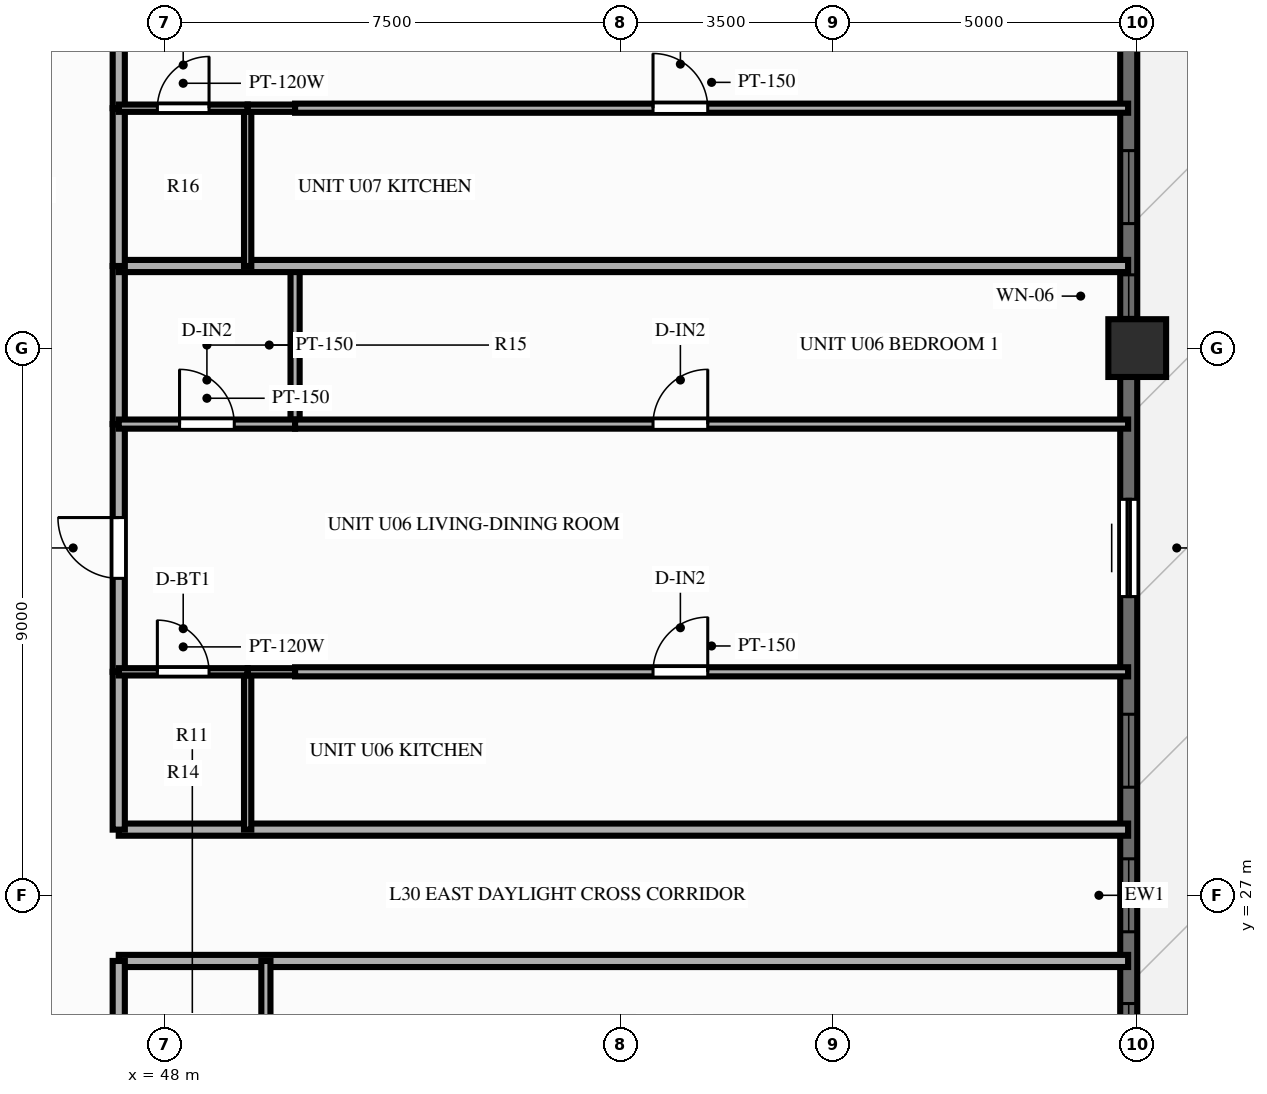
"""IFC4 building model, lengths in metres.
Left out: names, types, materials, properties, quantities, classifications, styles, units other than length and angle.
Written with IfcOpenShell. Run it as: python <this file> out.ifc"""

import sys

from ifc_helpers import new_model, si_unit, direction, frame, frame_2d, origin, origin_2d, place, context, subcontext, project, spatial, rectangle, extrude, source, transform, mapped, element, fill, save


model = new_model("IFC4")
c1 = context("Model", 3, precision=1e-05, world=origin(), true_north=direction((0.0, 1.0)))
c2 = subcontext(c1, "Body", "Model", "MODEL_VIEW")
j1 = project(units=[si_unit("LENGTHUNIT", "METRE"), si_unit("PLANEANGLEUNIT", "RADIAN")], contexts=[c1])
p1 = place(None, origin())
s1 = spatial("IfcSite", under=j1, at=p1, CompositionType="ELEMENT")
p2 = place(p1, origin())
s2 = spatial("IfcBuilding", under=s1, at=p2, CompositionType="ELEMENT")
p3 = place(p2, frame((0.0, 0.0, 95.85)))
s3 = spatial("IfcBuildingStorey", under=s2, at=p3, CompositionType="ELEMENT", Elevation=95.85)
m1 = source(origin(), c2, "Body", "SweptSolid", [
    extrude(rectangle(XDim=0.95, YDim=0.95, at=origin_2d()), origin(), (0.0, 0.0, 1.0), 3.0),
])
p4 = place(p3, frame((64.0, 36.0, 0.0), z_axis=(0.0, 0.0, 1.0), x_axis=(1.0, 0.0, 0.0)))
e1 = element("IfcColumn", 1, at=p4, inside=s3, PredefinedType="COLUMN", context=c2, shape_type="MappedRepresentation", body=[
    mapped(m1, transform((0.0, 0.0, 0.0), scale=1.0)),
])
p5 = place(p3, frame((63.86, 7.2, 0.0), z_axis=(0.0, 0.0, 1.0), x_axis=(0.0, 1.0, 0.0)))
e2 = element("IfcWall", 2, at=p5, inside=s3, PredefinedType="SOLIDWALL", context=c2, shape_type="SweptSolid", body=[
    extrude(rectangle(XDim=39.6, YDim=0.28, at=frame_2d((19.8, 0.0))), origin(), (0.0, 0.0, 1.0), 2.28),
])
p6 = place(p5, frame((0.945, 0.0, 0.25)))
e3 = element("IfcOpeningElement", 3, at=p6, cuts=e2, PredefinedType="OPENING", context=c2, shape_type="SweptSolid", body=[
    extrude(rectangle(XDim=1.2, YDim=1.5, at=frame_2d((0.6, 0.75))), frame((0.0, 0.152, 0.0), z_axis=(0.0, -1.0, 0.0), x_axis=(1.0, 0.0, 0.0)), (0.0, 0.0, 1.0), 0.304),
])
p7 = place(p5, frame((4.213, 0.0, 0.25)))
e4 = element("IfcOpeningElement", 4, at=p7, cuts=e2, PredefinedType="OPENING", context=c2, shape_type="SweptSolid", body=[
    extrude(rectangle(XDim=1.2, YDim=1.5, at=frame_2d((0.6, 0.75))), frame((0.0, 0.152, 0.0), z_axis=(0.0, -1.0, 0.0), x_axis=(1.0, 0.0, 0.0)), (0.0, 0.0, 1.0), 0.304),
])
p8 = place(p5, frame((7.55, 0.0, 0.25)))
e5 = element("IfcOpeningElement", 5, at=p8, cuts=e2, PredefinedType="OPENING", context=c2, shape_type="SweptSolid", body=[
    extrude(rectangle(XDim=1.2, YDim=1.5, at=frame_2d((0.6, 0.75))), frame((0.0, 0.152, 0.0), z_axis=(0.0, -1.0, 0.0), x_axis=(1.0, 0.0, 0.0)), (0.0, 0.0, 1.0), 0.304),
])
p9 = place(p5, frame((13.483, 0.0, 0.25)))
e6 = element("IfcOpeningElement", 6, at=p9, cuts=e2, PredefinedType="OPENING", context=c2, shape_type="SweptSolid", body=[
    extrude(rectangle(XDim=1.2, YDim=1.5, at=frame_2d((0.6, 0.75))), frame((0.0, 0.152, 0.0), z_axis=(0.0, -1.0, 0.0), x_axis=(1.0, 0.0, 0.0)), (0.0, 0.0, 1.0), 0.304),
])
p10 = place(p5, frame((16.82, 0.0, 0.25)))
e7 = element("IfcOpeningElement", 7, at=p10, cuts=e2, PredefinedType="OPENING", context=c2, shape_type="SweptSolid", body=[
    extrude(rectangle(XDim=1.2, YDim=1.5, at=frame_2d((0.6, 0.75))), frame((0.0, 0.152, 0.0), z_axis=(0.0, -1.0, 0.0), x_axis=(1.0, 0.0, 0.0)), (0.0, 0.0, 1.0), 0.304),
])
p11 = place(p5, frame((19.2, 0.0, 0.25)))
e8 = element("IfcOpeningElement", 8, at=p11, cuts=e2, PredefinedType="OPENING", context=c2, shape_type="SweptSolid", body=[
    extrude(rectangle(XDim=1.2, YDim=1.5, at=frame_2d((0.6, 0.75))), frame((0.0, 0.152, 0.0), z_axis=(0.0, -1.0, 0.0), x_axis=(1.0, 0.0, 0.0)), (0.0, 0.0, 1.0), 0.304),
])
p12 = place(p5, frame((21.578, 0.0, 0.25)))
e9 = element("IfcOpeningElement", 9, at=p12, cuts=e2, PredefinedType="OPENING", context=c2, shape_type="SweptSolid", body=[
    extrude(rectangle(XDim=1.2, YDim=1.5, at=frame_2d((0.6, 0.75))), frame((0.0, 0.152, 0.0), z_axis=(0.0, -1.0, 0.0), x_axis=(1.0, 0.0, 0.0)), (0.0, 0.0, 1.0), 0.304),
])
p13 = place(p5, frame((26.313, 0.0, 0.0), z_axis=(0.0, 0.0, 1.0), x_axis=(-1.0, 0.0, 0.0)))
e10 = element("IfcOpeningElement", 10, at=p13, cuts=e2, PredefinedType="OPENING", context=c2, shape_type="SweptSolid", body=[
    extrude(rectangle(XDim=1.6, YDim=2.15, at=frame_2d((0.8, 1.075))), frame((0.0, 0.152, 0.0), z_axis=(0.0, -1.0, 0.0), x_axis=(1.0, 0.0, 0.0)), (0.0, 0.0, 1.0), 0.304),
])
p14 = place(p5, frame((29.305, 0.0, 0.25)))
e11 = element("IfcOpeningElement", 11, at=p14, cuts=e2, PredefinedType="OPENING", context=c2, shape_type="SweptSolid", body=[
    extrude(rectangle(XDim=0.7, YDim=1.5, at=frame_2d((0.35, 0.75))), frame((0.0, 0.152, 0.0), z_axis=(0.0, -1.0, 0.0), x_axis=(1.0, 0.0, 0.0)), (0.0, 0.0, 1.0), 0.304),
])
p15 = place(p5, frame((30.848, 0.0, 0.25)))
e12 = element("IfcOpeningElement", 12, at=p15, cuts=e2, PredefinedType="OPENING", context=c2, shape_type="SweptSolid", body=[
    extrude(rectangle(XDim=1.2, YDim=1.5, at=frame_2d((0.6, 0.75))), frame((0.0, 0.152, 0.0), z_axis=(0.0, -1.0, 0.0), x_axis=(1.0, 0.0, 0.0)), (0.0, 0.0, 1.0), 0.304),
])
p16 = place(p5, frame((34.183, 0.0, 0.25)))
e13 = element("IfcOpeningElement", 13, at=p16, cuts=e2, PredefinedType="OPENING", context=c2, shape_type="SweptSolid", body=[
    extrude(rectangle(XDim=1.2, YDim=1.5, at=frame_2d((0.6, 0.75))), frame((0.0, 0.152, 0.0), z_axis=(0.0, -1.0, 0.0), x_axis=(1.0, 0.0, 0.0)), (0.0, 0.0, 1.0), 0.304),
])
p17 = place(p5, frame((37.452, 0.0, 0.25)))
e14 = element("IfcOpeningElement", 14, at=p17, cuts=e2, PredefinedType="OPENING", context=c2, shape_type="SweptSolid", body=[
    extrude(rectangle(XDim=1.2, YDim=1.5, at=frame_2d((0.6, 0.75))), frame((0.0, 0.152, 0.0), z_axis=(0.0, -1.0, 0.0), x_axis=(1.0, 0.0, 0.0)), (0.0, 0.0, 1.0), 0.304),
])
p18 = place(p3, frame((47.25, 25.92, 0.0), z_axis=(0.0, 0.0, 1.0), x_axis=(1.0, 0.0, 0.0)))
e15 = element("IfcWall", 15, at=p18, inside=s3, PredefinedType="PARTITIONING", context=c2, shape_type="SweptSolid", body=[
    extrude(rectangle(XDim=16.6, YDim=0.2, at=frame_2d((8.3, 0.0))), origin(), (0.0, 0.0, 1.0), 2.79),
])
p19 = place(p3, frame((47.25, 23.32, 0.0), z_axis=(0.0, 0.0, 1.0), x_axis=(0.0, 1.0, 0.0)))
e16 = element("IfcWall", 16, at=p19, inside=s3, PredefinedType="PARTITIONING", context=c2, shape_type="SweptSolid", body=[
    extrude(rectangle(XDim=2.6, YDim=0.2, at=frame_2d((1.3, 0.0))), origin(), (0.0, 0.0, 1.0), 2.79),
])
p20 = place(p3, frame((49.67, 23.32, 0.0), z_axis=(0.0, 0.0, 1.0), x_axis=(0.0, 1.0, 0.0)))
e17 = element("IfcWall", 17, at=p20, inside=s3, PredefinedType="PARTITIONING", context=c2, shape_type="SweptSolid", body=[
    extrude(rectangle(XDim=2.6, YDim=0.15, at=frame_2d((1.3, 0.0))), origin(), (0.0, 0.0, 1.0), 2.79),
])
p21 = place(p3, frame((47.25, 28.08, 0.0), z_axis=(0.0, 0.0, 1.0), x_axis=(1.0, 0.0, 0.0)))
e18 = element("IfcWall", 18, at=p21, inside=s3, PredefinedType="PARTITIONING", context=c2, shape_type="SweptSolid", body=[
    extrude(rectangle(XDim=16.6, YDim=0.2, at=frame_2d((8.3, 0.0))), origin(), (0.0, 0.0, 1.0), 2.79),
])
p22 = place(p3, frame((47.25, 28.08, 0.0), z_axis=(0.0, 0.0, 1.0), x_axis=(0.0, 1.0, 0.0)))
e19 = element("IfcWall", 19, at=p22, inside=s3, PredefinedType="PARTITIONING", context=c2, shape_type="SweptSolid", body=[
    extrude(rectangle(XDim=2.595, YDim=0.2, at=frame_2d((1.298, 0.0))), origin(), (0.0, 0.0, 1.0), 2.79),
])
p23 = place(p3, frame((47.25, 30.676, 0.0), z_axis=(0.0, 0.0, 1.0), x_axis=(0.0, 1.0, 0.0)))
e20 = element("IfcWall", 20, at=p23, inside=s3, PredefinedType="PARTITIONING", context=c2, shape_type="SweptSolid", body=[
    extrude(rectangle(XDim=4.074, YDim=0.2, at=frame_2d((2.037, 0.0))), origin(), (0.0, 0.0, 1.0), 2.79),
])
p24 = place(p23, frame((1.537, 0.0, 0.0)))
e21 = element("IfcOpeningElement", 21, at=p24, cuts=e20, PredefinedType="OPENING", context=c2, shape_type="SweptSolid", body=[
    extrude(rectangle(XDim=1.0, YDim=2.15, at=frame_2d((0.5, 1.075))), frame((0.0, 0.112, 0.0), z_axis=(0.0, -1.0, 0.0), x_axis=(1.0, 0.0, 0.0)), (0.0, 0.0, 1.0), 0.224),
])
p25 = place(p3, frame((47.25, 34.75, 0.0), z_axis=(0.0, 0.0, 1.0), x_axis=(0.0, 1.0, 0.0)))
e22 = element("IfcWall", 22, at=p25, inside=s3, PredefinedType="PARTITIONING", context=c2, shape_type="SweptSolid", body=[
    extrude(rectangle(XDim=2.6, YDim=0.2, at=frame_2d((1.3, 0.0))), origin(), (0.0, 0.0, 1.0), 2.79),
])
p26 = place(p3, frame((49.37, 28.08, 0.0), z_axis=(0.0, 0.0, 1.0), x_axis=(0.0, 1.0, 0.0)))
e23 = element("IfcWall", 23, at=p26, inside=s3, PredefinedType="PARTITIONING", context=c2, shape_type="SweptSolid", body=[
    extrude(rectangle(XDim=2.595, YDim=0.12, at=frame_2d((1.298, 0.0))), origin(), (0.0, 0.0, 1.0), 2.79),
])
p27 = place(p3, frame((50.15, 34.75, 0.0), z_axis=(0.0, 0.0, 1.0), x_axis=(0.0, 1.0, 0.0)))
e24 = element("IfcWall", 24, at=p27, inside=s3, PredefinedType="PARTITIONING", context=c2, shape_type="SweptSolid", body=[
    extrude(rectangle(XDim=2.6, YDim=0.15, at=frame_2d((1.3, 0.0))), origin(), (0.0, 0.0, 1.0), 2.79),
])
p28 = place(p3, frame((47.25, 30.676, 0.0), z_axis=(0.0, 0.0, 1.0), x_axis=(1.0, 0.0, 0.0)))
e25 = element("IfcWall", 25, at=p28, inside=s3, PredefinedType="PARTITIONING", context=c2, shape_type="SweptSolid", body=[
    extrude(rectangle(XDim=2.12, YDim=0.12, at=frame_2d((1.06, 0.0))), origin(), (0.0, 0.0, 1.0), 2.79),
])
p29 = place(p28, frame((0.635, 0.0, 0.0)))
e26 = element("IfcOpeningElement", 26, at=p29, cuts=e25, PredefinedType="OPENING", context=c2, shape_type="SweptSolid", body=[
    extrude(rectangle(XDim=0.85, YDim=2.05, at=frame_2d((0.425, 1.025))), frame((0.0, 0.072, 0.0), z_axis=(0.0, -1.0, 0.0), x_axis=(1.0, 0.0, 0.0)), (0.0, 0.0, 1.0), 0.144),
])
p30 = place(p3, frame((49.37, 30.676, 0.0), z_axis=(0.0, 0.0, 1.0), x_axis=(1.0, 0.0, 0.0)))
e27 = element("IfcWall", 27, at=p30, inside=s3, PredefinedType="PARTITIONING", context=c2, shape_type="SweptSolid", body=[
    extrude(rectangle(XDim=0.78, YDim=0.12, at=frame_2d((0.39, 0.0))), origin(), (0.0, 0.0, 1.0), 2.79),
])
p31 = place(p3, frame((50.15, 30.676, 0.0), z_axis=(0.0, 0.0, 1.0), x_axis=(1.0, 0.0, 0.0)))
e28 = element("IfcWall", 28, at=p31, inside=s3, PredefinedType="PARTITIONING", context=c2, shape_type="SweptSolid", body=[
    extrude(rectangle(XDim=13.7, YDim=0.15, at=frame_2d((6.85, 0.0))), origin(), (0.0, 0.0, 1.0), 2.79),
])
p32 = place(p31, frame((5.887, 0.0, 0.0)))
e29 = element("IfcOpeningElement", 29, at=p32, cuts=e28, PredefinedType="OPENING", context=c2, shape_type="SweptSolid", body=[
    extrude(rectangle(XDim=0.9, YDim=2.1, at=frame_2d((0.45, 1.05))), frame((0.0, 0.087, 0.0), z_axis=(0.0, -1.0, 0.0), x_axis=(1.0, 0.0, 0.0)), (0.0, 0.0, 1.0), 0.174),
])
p33 = place(p3, frame((47.25, 34.75, 0.0), z_axis=(0.0, 0.0, 1.0), x_axis=(1.0, 0.0, 0.0)))
e30 = element("IfcWall", 30, at=p33, inside=s3, PredefinedType="PARTITIONING", context=c2, shape_type="SweptSolid", body=[
    extrude(rectangle(XDim=2.9, YDim=0.15, at=frame_2d((1.45, 0.0))), origin(), (0.0, 0.0, 1.0), 2.79),
])
p34 = place(p33, frame((1.0, 0.0, 0.0)))
e31 = element("IfcOpeningElement", 31, at=p34, cuts=e30, PredefinedType="OPENING", context=c2, shape_type="SweptSolid", body=[
    extrude(rectangle(XDim=0.9, YDim=2.1, at=frame_2d((0.45, 1.05))), frame((0.0, 0.087, 0.0), z_axis=(0.0, -1.0, 0.0), x_axis=(1.0, 0.0, 0.0)), (0.0, 0.0, 1.0), 0.174),
])
p35 = place(p3, frame((50.15, 34.75, 0.0), z_axis=(0.0, 0.0, 1.0), x_axis=(1.0, 0.0, 0.0)))
e32 = element("IfcWall", 32, at=p35, inside=s3, PredefinedType="PARTITIONING", context=c2, shape_type="SweptSolid", body=[
    extrude(rectangle(XDim=13.7, YDim=0.15, at=frame_2d((6.85, 0.0))), origin(), (0.0, 0.0, 1.0), 2.79),
])
p36 = place(p35, frame((5.887, 0.0, 0.0)))
e33 = element("IfcOpeningElement", 33, at=p36, cuts=e32, PredefinedType="OPENING", context=c2, shape_type="SweptSolid", body=[
    extrude(rectangle(XDim=0.9, YDim=2.1, at=frame_2d((0.45, 1.05))), frame((0.0, 0.087, 0.0), z_axis=(0.0, -1.0, 0.0), x_axis=(1.0, 0.0, 0.0)), (0.0, 0.0, 1.0), 0.174),
])
p37 = place(p3, frame((47.25, 37.35, 0.0), z_axis=(0.0, 0.0, 1.0), x_axis=(1.0, 0.0, 0.0)))
e34 = element("IfcWall", 34, at=p37, inside=s3, PredefinedType="PARTITIONING", context=c2, shape_type="SweptSolid", body=[
    extrude(rectangle(XDim=16.6, YDim=0.2, at=frame_2d((8.3, 0.0))), origin(), (0.0, 0.0, 1.0), 2.79),
])
p38 = place(p3, frame((47.25, 37.35, 0.0), z_axis=(0.0, 0.0, 1.0), x_axis=(0.0, 1.0, 0.0)))
e35 = element("IfcWall", 35, at=p38, inside=s3, PredefinedType="PARTITIONING", context=c2, shape_type="SweptSolid", body=[
    extrude(rectangle(XDim=2.595, YDim=0.2, at=frame_2d((1.298, 0.0))), origin(), (0.0, 0.0, 1.0), 2.79),
])
p39 = place(p3, frame((47.25, 39.946, 0.0), z_axis=(0.0, 0.0, 1.0), x_axis=(0.0, 1.0, 0.0)))
e36 = element("IfcWall", 36, at=p39, inside=s3, PredefinedType="PARTITIONING", context=c2, shape_type="SweptSolid", body=[
    extrude(rectangle(XDim=4.074, YDim=0.2, at=frame_2d((2.037, 0.0))), origin(), (0.0, 0.0, 1.0), 2.79),
])
p40 = place(p39, frame((1.537, 0.0, 0.0)))
e37 = element("IfcOpeningElement", 37, at=p40, cuts=e36, PredefinedType="OPENING", context=c2, shape_type="SweptSolid", body=[
    extrude(rectangle(XDim=1.0, YDim=2.15, at=frame_2d((0.5, 1.075))), frame((0.0, 0.112, 0.0), z_axis=(0.0, -1.0, 0.0), x_axis=(1.0, 0.0, 0.0)), (0.0, 0.0, 1.0), 0.224),
])
p41 = place(p3, frame((49.37, 37.35, 0.0), z_axis=(0.0, 0.0, 1.0), x_axis=(0.0, 1.0, 0.0)))
e38 = element("IfcWall", 38, at=p41, inside=s3, PredefinedType="PARTITIONING", context=c2, shape_type="SweptSolid", body=[
    extrude(rectangle(XDim=2.595, YDim=0.12, at=frame_2d((1.298, 0.0))), origin(), (0.0, 0.0, 1.0), 2.79),
])
p42 = place(p3, frame((47.25, 39.946, 0.0), z_axis=(0.0, 0.0, 1.0), x_axis=(1.0, 0.0, 0.0)))
e39 = element("IfcWall", 39, at=p42, inside=s3, PredefinedType="PARTITIONING", context=c2, shape_type="SweptSolid", body=[
    extrude(rectangle(XDim=2.12, YDim=0.12, at=frame_2d((1.06, 0.0))), origin(), (0.0, 0.0, 1.0), 2.79),
])
p43 = place(p42, frame((0.635, 0.0, 0.0)))
e40 = element("IfcOpeningElement", 40, at=p43, cuts=e39, PredefinedType="OPENING", context=c2, shape_type="SweptSolid", body=[
    extrude(rectangle(XDim=0.85, YDim=2.05, at=frame_2d((0.425, 1.025))), frame((0.0, 0.072, 0.0), z_axis=(0.0, -1.0, 0.0), x_axis=(1.0, 0.0, 0.0)), (0.0, 0.0, 1.0), 0.144),
])
p44 = place(p3, frame((49.37, 39.946, 0.0), z_axis=(0.0, 0.0, 1.0), x_axis=(1.0, 0.0, 0.0)))
e41 = element("IfcWall", 41, at=p44, inside=s3, PredefinedType="PARTITIONING", context=c2, shape_type="SweptSolid", body=[
    extrude(rectangle(XDim=0.78, YDim=0.12, at=frame_2d((0.39, 0.0))), origin(), (0.0, 0.0, 1.0), 2.79),
])
p45 = place(p3, frame((50.15, 39.946, 0.0), z_axis=(0.0, 0.0, 1.0), x_axis=(1.0, 0.0, 0.0)))
e42 = element("IfcWall", 42, at=p45, inside=s3, PredefinedType="PARTITIONING", context=c2, shape_type="SweptSolid", body=[
    extrude(rectangle(XDim=13.7, YDim=0.15, at=frame_2d((6.85, 0.0))), origin(), (0.0, 0.0, 1.0), 2.79),
])
p46 = place(p45, frame((5.887, 0.0, 0.0)))
e43 = element("IfcOpeningElement", 43, at=p46, cuts=e42, PredefinedType="OPENING", context=c2, shape_type="SweptSolid", body=[
    extrude(rectangle(XDim=0.9, YDim=2.1, at=frame_2d((0.45, 1.05))), frame((0.0, 0.087, 0.0), z_axis=(0.0, -1.0, 0.0), x_axis=(1.0, 0.0, 0.0)), (0.0, 0.0, 1.0), 0.174),
])
m2 = source(origin(), c2, "Body", "SweptSolid", [
    extrude(rectangle(XDim=1.2, YDim=1.5, at=frame_2d((0.6, 0.75))), frame((0.0, 0.03, 0.0), z_axis=(0.0, -1.0, 0.0), x_axis=(1.0, 0.0, 0.0)), (0.0, 0.0, 1.0), 0.06),
])
p47 = place(p10, origin())
e44 = element("IfcWindow", 44, at=p47, inside=s3, PartitioningType="SINGLE_PANEL", PredefinedType="WINDOW", context=c2, shape_type="MappedRepresentation", body=[
    mapped(m2, transform((0.0, 0.0, 0.0), scale=1.0)),
])
fill(e7, e44)
p48 = place(p11, origin())
e45 = element("IfcWindow", 45, at=p48, inside=s3, PartitioningType="SINGLE_PANEL", PredefinedType="WINDOW", context=c2, shape_type="MappedRepresentation", body=[
    mapped(m2, transform((0.0, 0.0, 0.0), scale=1.0)),
])
fill(e8, e45)
p49 = place(p12, origin())
e46 = element("IfcWindow", 46, at=p49, inside=s3, PartitioningType="SINGLE_PANEL", PredefinedType="WINDOW", context=c2, shape_type="MappedRepresentation", body=[
    mapped(m2, transform((0.0, 0.0, 0.0), scale=1.0)),
])
fill(e9, e46)
m3 = source(origin(), c2, "Body", "SweptSolid", [
    extrude(rectangle(XDim=1.6, YDim=2.15, at=frame_2d((0.8, 1.075))), frame((0.0, 0.025, 0.0), z_axis=(0.0, -1.0, 0.0), x_axis=(1.0, 0.0, 0.0)), (0.0, 0.0, 1.0), 0.05),
])
p50 = place(p13, origin())
e47 = element("IfcDoor", 47, at=p50, inside=s3, OperationType="SLIDING_TO_LEFT", PredefinedType="DOOR", context=c2, shape_type="MappedRepresentation", body=[
    mapped(m3, transform((0.0, 0.0, 0.0), scale=1.0)),
])
fill(e10, e47)
m4 = source(origin(), c2, "Body", "SweptSolid", [
    extrude(rectangle(XDim=0.7, YDim=1.5, at=frame_2d((0.35, 0.75))), frame((0.0, 0.03, 0.0), z_axis=(0.0, -1.0, 0.0), x_axis=(1.0, 0.0, 0.0)), (0.0, 0.0, 1.0), 0.06),
])
p51 = place(p14, origin())
e48 = element("IfcWindow", 48, at=p51, inside=s3, PartitioningType="SINGLE_PANEL", PredefinedType="WINDOW", context=c2, shape_type="MappedRepresentation", body=[
    mapped(m4, transform((0.0, 0.0, 0.0), scale=1.0)),
])
fill(e11, e48)
p52 = place(p15, origin())
e49 = element("IfcWindow", 49, at=p52, inside=s3, PartitioningType="SINGLE_PANEL", PredefinedType="WINDOW", context=c2, shape_type="MappedRepresentation", body=[
    mapped(m2, transform((0.0, 0.0, 0.0), scale=1.0)),
])
fill(e12, e49)
m5 = source(origin(), c2, "Body", "SweptSolid", [
    extrude(rectangle(XDim=1.0, YDim=2.15, at=frame_2d((0.5, 1.075))), frame((0.0, 0.025, 0.0), z_axis=(0.0, -1.0, 0.0), x_axis=(1.0, 0.0, 0.0)), (0.0, 0.0, 1.0), 0.05),
])
p53 = place(p24, origin())
e50 = element("IfcDoor", 50, at=p53, inside=s3, OperationType="SINGLE_SWING_RIGHT", PredefinedType="DOOR", context=c2, shape_type="MappedRepresentation", body=[
    mapped(m5, transform((0.0, 0.0, 0.0), scale=1.0)),
])
fill(e21, e50)
m6 = source(origin(), c2, "Body", "SweptSolid", [
    extrude(rectangle(XDim=0.85, YDim=2.05, at=frame_2d((0.425, 1.025))), frame((0.0, 0.025, 0.0), z_axis=(0.0, -1.0, 0.0), x_axis=(1.0, 0.0, 0.0)), (0.0, 0.0, 1.0), 0.05),
])
p54 = place(p29, origin())
e51 = element("IfcDoor", 51, at=p54, inside=s3, OperationType="SINGLE_SWING_LEFT", PredefinedType="DOOR", context=c2, shape_type="MappedRepresentation", body=[
    mapped(m6, transform((0.0, 0.0, 0.0), scale=1.0)),
])
fill(e26, e51)
m7 = source(origin(), c2, "Body", "SweptSolid", [
    extrude(rectangle(XDim=0.9, YDim=2.1, at=frame_2d((0.45, 1.05))), frame((0.0, 0.025, 0.0), z_axis=(0.0, -1.0, 0.0), x_axis=(1.0, 0.0, 0.0)), (0.0, 0.0, 1.0), 0.05),
])
p55 = place(p32, origin())
e52 = element("IfcDoor", 52, at=p55, inside=s3, OperationType="SINGLE_SWING_RIGHT", PredefinedType="DOOR", context=c2, shape_type="MappedRepresentation", body=[
    mapped(m7, transform((0.0, 0.0, 0.0), scale=1.0)),
])
fill(e29, e52)
p56 = place(p34, origin())
e53 = element("IfcDoor", 53, at=p56, inside=s3, OperationType="SINGLE_SWING_LEFT", PredefinedType="DOOR", context=c2, shape_type="MappedRepresentation", body=[
    mapped(m7, transform((0.0, 0.0, 0.0), scale=1.0)),
])
fill(e31, e53)
p57 = place(p36, origin())
e54 = element("IfcDoor", 54, at=p57, inside=s3, OperationType="SINGLE_SWING_RIGHT", PredefinedType="DOOR", context=c2, shape_type="MappedRepresentation", body=[
    mapped(m7, transform((0.0, 0.0, 0.0), scale=1.0)),
])
fill(e33, e54)
p58 = place(p43, origin())
e55 = element("IfcDoor", 55, at=p58, inside=s3, OperationType="SINGLE_SWING_RIGHT", PredefinedType="DOOR", context=c2, shape_type="MappedRepresentation", body=[
    mapped(m6, transform((0.0, 0.0, 0.0), scale=1.0)),
])
fill(e40, e55)
p59 = place(p46, origin())
e56 = element("IfcDoor", 56, at=p59, inside=s3, OperationType="SINGLE_SWING_LEFT", PredefinedType="DOOR", context=c2, shape_type="MappedRepresentation", body=[
    mapped(m7, transform((0.0, 0.0, 0.0), scale=1.0)),
])
fill(e43, e56)
save(model, sys.argv[1])
